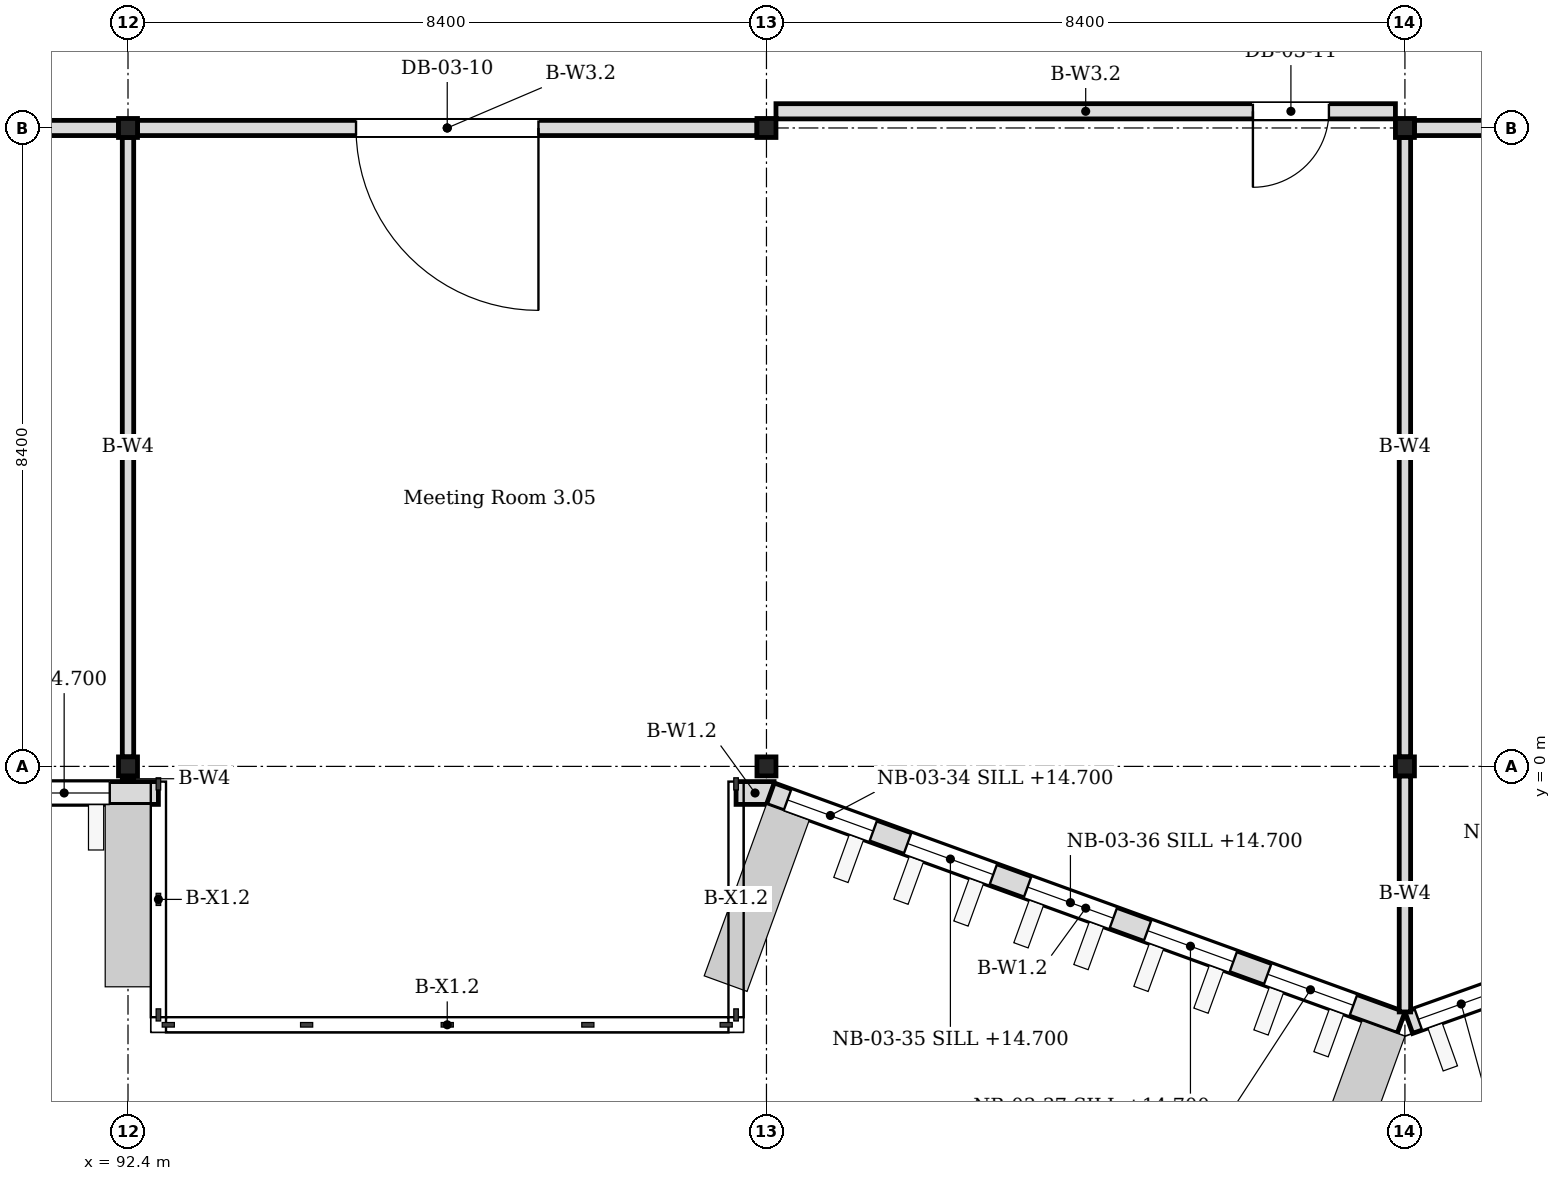
"""IFC4 building model, lengths in metres.
Left out: names, types, materials, properties, quantities, classifications, styles, units other than length and angle.
Written with IfcOpenShell. Run it as: python <this file> out.ifc"""

import sys

from ifc_helpers import new_model, si_unit, direction, frame, frame_2d, origin, origin_2d, place, context, subcontext, project, spatial, rectangle, i_section, extrude, element, fill, save


model = new_model("IFC4")
c1 = context("Model", 3, precision=1e-05, world=origin(), true_north=direction((0.0, 1.0)))
c2 = subcontext(c1, "Body", "Model", "MODEL_VIEW")
j1 = project(units=[si_unit("LENGTHUNIT", "METRE"), si_unit("PLANEANGLEUNIT", "RADIAN")], contexts=[c1])
p1 = place(None, origin())
s1 = spatial("IfcSite", under=j1, at=p1, CompositionType="ELEMENT")
p2 = place(p1, origin())
s2 = spatial("IfcBuilding", under=s1, at=p2, CompositionType="ELEMENT")
p3 = place(p2, frame((0.0, 0.0, 14.4)))
s3 = spatial("IfcBuildingStorey", under=s2, at=p3, CompositionType="ELEMENT", Elevation=14.4)
for number, where, z_axis, x_axis in (
    (1, (92.4, 0.0, 0.0), (0.0, 0.0, 1.0), (1.0, 0.0, 0.0)),
    (2, (92.4, 8.4, 0.0), (0.0, 0.0, 1.0), (1.0, 0.0, 0.0)),
    (3, (100.8, 0.0, 0.0), (0.0, 0.0, 1.0), (1.0, 0.0, 0.0)),
    (4, (100.8, 8.4, 0.0), (0.0, 0.0, 1.0), (1.0, 0.0, 0.0)),
    (5, (109.2, 0.0, 0.0), (0.0, 0.0, 1.0), (1.0, 0.0, 0.0)),
    (6, (109.2, 8.4, 0.0), (0.0, 0.0, 1.0), (1.0, 0.0, 0.0)),
):
    element("IfcColumn", number, at=place(p3, frame(where, z_axis=z_axis, x_axis=x_axis)), inside=s3, PredefinedType="COLUMN", context=c2, shape_type="SweptSolid", body=[
        extrude(i_section(OverallWidth=0.25, OverallDepth=0.25, WebThickness=0.009, FlangeThickness=0.014, FilletRadius=0.013, at=origin_2d()), origin(), (0.0, 0.0, 1.0), 3.95),
    ])
p4 = place(p3, frame((83.6, -0.35, 0.0), z_axis=(0.0, 0.0, 1.0), x_axis=(1.0, 0.0, 0.0)))
e7 = element("IfcWall", 7, at=p4, inside=s3, PredefinedType="SOLIDWALL", context=c2, shape_type="SweptSolid", body=[
    extrude(rectangle(XDim=9.2, YDim=0.3, at=frame_2d((4.6, 0.0))), origin(), (0.0, 0.0, 1.0), 3.95),
])
p5 = place(p4, frame((0.64, 0.0, 0.3)))
e8 = element("IfcOpeningElement", 8, at=p5, cuts=e7, PredefinedType="OPENING", context=c2, shape_type="SweptSolid", body=[
    extrude(rectangle(XDim=1.2, YDim=3.3, at=frame_2d((0.6, 1.65))), frame((0.0, 0.16, 0.0), z_axis=(0.0, -1.0, 0.0), x_axis=(1.0, 0.0, 0.0)), (0.0, 0.0, 1.0), 0.32),
])
p6 = place(p4, frame((2.32, 0.0, 0.3)))
e9 = element("IfcOpeningElement", 9, at=p6, cuts=e7, PredefinedType="OPENING", context=c2, shape_type="SweptSolid", body=[
    extrude(rectangle(XDim=1.2, YDim=3.3, at=frame_2d((0.6, 1.65))), frame((0.0, 0.16, 0.0), z_axis=(0.0, -1.0, 0.0), x_axis=(1.0, 0.0, 0.0)), (0.0, 0.0, 1.0), 0.32),
])
p7 = place(p4, frame((4.0, 0.0, 0.3)))
e10 = element("IfcOpeningElement", 10, at=p7, cuts=e7, PredefinedType="OPENING", context=c2, shape_type="SweptSolid", body=[
    extrude(rectangle(XDim=1.2, YDim=3.3, at=frame_2d((0.6, 1.65))), frame((0.0, 0.16, 0.0), z_axis=(0.0, -1.0, 0.0), x_axis=(1.0, 0.0, 0.0)), (0.0, 0.0, 1.0), 0.32),
])
p8 = place(p4, frame((5.68, 0.0, 0.3)))
e11 = element("IfcOpeningElement", 11, at=p8, cuts=e7, PredefinedType="OPENING", context=c2, shape_type="SweptSolid", body=[
    extrude(rectangle(XDim=1.2, YDim=3.3, at=frame_2d((0.6, 1.65))), frame((0.0, 0.16, 0.0), z_axis=(0.0, -1.0, 0.0), x_axis=(1.0, 0.0, 0.0)), (0.0, 0.0, 1.0), 0.32),
])
p9 = place(p4, frame((7.36, 0.0, 0.3)))
e12 = element("IfcOpeningElement", 12, at=p9, cuts=e7, PredefinedType="OPENING", context=c2, shape_type="SweptSolid", body=[
    extrude(rectangle(XDim=1.2, YDim=3.3, at=frame_2d((0.6, 1.65))), frame((0.0, 0.16, 0.0), z_axis=(0.0, -1.0, 0.0), x_axis=(1.0, 0.0, 0.0)), (0.0, 0.0, 1.0), 0.32),
])
p10 = place(p3, frame((100.4, -0.35, 0.0), z_axis=(0.0, 0.0, 1.0), x_axis=(1.0, 0.0, 0.0)))
e13 = element("IfcWall", 13, at=p10, inside=s3, PredefinedType="SOLIDWALL", context=c2, shape_type="SweptSolid", body=[
    extrude(rectangle(XDim=0.5, YDim=0.3, at=frame_2d((0.25, 0.0))), origin(), (0.0, 0.0, 1.0), 3.95),
])
p11 = place(p3, frame((100.851, -0.359, 0.0), z_axis=(0.0, 0.0, 1.0), x_axis=(0.939953187971, -0.341303390584, 0.0)))
e14 = element("IfcWall", 14, at=p11, inside=s3, PredefinedType="SOLIDWALL", context=c2, shape_type="SweptSolid", body=[
    extrude(rectangle(XDim=8.828, YDim=0.3, at=frame_2d((4.414, 0.0))), origin(), (0.0, 0.0, 1.0), 3.95),
])
p12 = place(p11, frame((0.24, 0.0, 0.3)))
e15 = element("IfcOpeningElement", 15, at=p12, cuts=e14, PredefinedType="OPENING", context=c2, shape_type="SweptSolid", body=[
    extrude(rectangle(XDim=1.2, YDim=3.3, at=frame_2d((0.6, 1.65))), frame((0.0, 0.16, 0.0), z_axis=(0.0, -1.0, 0.0), x_axis=(1.0, 0.0, 0.0)), (0.0, 0.0, 1.0), 0.32),
])
p13 = place(p11, frame((1.92, 0.0, 0.3)))
e16 = element("IfcOpeningElement", 16, at=p13, cuts=e14, PredefinedType="OPENING", context=c2, shape_type="SweptSolid", body=[
    extrude(rectangle(XDim=1.2, YDim=3.3, at=frame_2d((0.6, 1.65))), frame((0.0, 0.16, 0.0), z_axis=(0.0, -1.0, 0.0), x_axis=(1.0, 0.0, 0.0)), (0.0, 0.0, 1.0), 0.32),
])
p14 = place(p11, frame((3.6, 0.0, 0.3)))
e17 = element("IfcOpeningElement", 17, at=p14, cuts=e14, PredefinedType="OPENING", context=c2, shape_type="SweptSolid", body=[
    extrude(rectangle(XDim=1.2, YDim=3.3, at=frame_2d((0.6, 1.65))), frame((0.0, 0.16, 0.0), z_axis=(0.0, -1.0, 0.0), x_axis=(1.0, 0.0, 0.0)), (0.0, 0.0, 1.0), 0.32),
])
p15 = place(p11, frame((5.28, 0.0, 0.3)))
e18 = element("IfcOpeningElement", 18, at=p15, cuts=e14, PredefinedType="OPENING", context=c2, shape_type="SweptSolid", body=[
    extrude(rectangle(XDim=1.2, YDim=3.3, at=frame_2d((0.6, 1.65))), frame((0.0, 0.16, 0.0), z_axis=(0.0, -1.0, 0.0), x_axis=(1.0, 0.0, 0.0)), (0.0, 0.0, 1.0), 0.32),
])
p16 = place(p11, frame((6.96, 0.0, 0.3)))
e19 = element("IfcOpeningElement", 19, at=p16, cuts=e14, PredefinedType="OPENING", context=c2, shape_type="SweptSolid", body=[
    extrude(rectangle(XDim=1.2, YDim=3.3, at=frame_2d((0.6, 1.65))), frame((0.0, 0.16, 0.0), z_axis=(0.0, -1.0, 0.0), x_axis=(1.0, 0.0, 0.0)), (0.0, 0.0, 1.0), 0.32),
])
p17 = place(p3, frame((109.251, -3.372, 0.0), z_axis=(0.0, 0.0, 1.0), x_axis=(0.941744418946, 0.336329376334, 0.0)))
e20 = element("IfcWall", 20, at=p17, inside=s3, PredefinedType="SOLIDWALL", context=c2, shape_type="SweptSolid", body=[
    extrude(rectangle(XDim=8.812, YDim=0.3, at=frame_2d((4.406, 0.0))), origin(), (0.0, 0.0, 1.0), 3.95),
])
p18 = place(p17, frame((0.132, 0.0, 0.3)))
e21 = element("IfcOpeningElement", 21, at=p18, cuts=e20, PredefinedType="OPENING", context=c2, shape_type="SweptSolid", body=[
    extrude(rectangle(XDim=1.2, YDim=3.3, at=frame_2d((0.6, 1.65))), frame((0.0, 0.16, 0.0), z_axis=(0.0, -1.0, 0.0), x_axis=(1.0, 0.0, 0.0)), (0.0, 0.0, 1.0), 0.32),
])
p19 = place(p17, frame((1.812, 0.0, 0.3)))
e22 = element("IfcOpeningElement", 22, at=p19, cuts=e20, PredefinedType="OPENING", context=c2, shape_type="SweptSolid", body=[
    extrude(rectangle(XDim=1.2, YDim=3.3, at=frame_2d((0.6, 1.65))), frame((0.0, 0.16, 0.0), z_axis=(0.0, -1.0, 0.0), x_axis=(1.0, 0.0, 0.0)), (0.0, 0.0, 1.0), 0.32),
])
p20 = place(p17, frame((3.492, 0.0, 0.3)))
e23 = element("IfcOpeningElement", 23, at=p20, cuts=e20, PredefinedType="OPENING", context=c2, shape_type="SweptSolid", body=[
    extrude(rectangle(XDim=1.2, YDim=3.3, at=frame_2d((0.6, 1.65))), frame((0.0, 0.16, 0.0), z_axis=(0.0, -1.0, 0.0), x_axis=(1.0, 0.0, 0.0)), (0.0, 0.0, 1.0), 0.32),
])
p21 = place(p17, frame((5.172, 0.0, 0.3)))
e24 = element("IfcOpeningElement", 24, at=p21, cuts=e20, PredefinedType="OPENING", context=c2, shape_type="SweptSolid", body=[
    extrude(rectangle(XDim=1.2, YDim=3.3, at=frame_2d((0.6, 1.65))), frame((0.0, 0.16, 0.0), z_axis=(0.0, -1.0, 0.0), x_axis=(1.0, 0.0, 0.0)), (0.0, 0.0, 1.0), 0.32),
])
p22 = place(p17, frame((6.852, 0.0, 0.3)))
e25 = element("IfcOpeningElement", 25, at=p22, cuts=e20, PredefinedType="OPENING", context=c2, shape_type="SweptSolid", body=[
    extrude(rectangle(XDim=1.2, YDim=3.3, at=frame_2d((0.6, 1.65))), frame((0.0, 0.16, 0.0), z_axis=(0.0, -1.0, 0.0), x_axis=(1.0, 0.0, 0.0)), (0.0, 0.0, 1.0), 0.32),
])
p23 = place(p3, frame((84.125, 8.4, 0.0), z_axis=(0.0, 0.0, 1.0), x_axis=(1.0, 0.0, 0.0)))
e26 = element("IfcWall", 26, at=p23, inside=s3, PredefinedType="PARTITIONING", context=c2, shape_type="SweptSolid", body=[
    extrude(rectangle(XDim=8.15, YDim=0.2, at=frame_2d((4.075, 0.0))), origin(), (0.0, 0.0, 1.0), 3.25),
])
p24 = place(p23, frame((3.575, 0.0, 0.0)))
e27 = element("IfcOpeningElement", 27, at=p24, cuts=e26, PredefinedType="OPENING", context=c2, shape_type="SweptSolid", body=[
    extrude(rectangle(XDim=1.0, YDim=2.1, at=frame_2d((0.5, 1.05))), frame((0.0, 0.11, 0.0), z_axis=(0.0, -1.0, 0.0), x_axis=(1.0, 0.0, 0.0)), (0.0, 0.0, 1.0), 0.22),
])
p25 = place(p3, frame((92.525, 8.4, 0.0), z_axis=(0.0, 0.0, 1.0), x_axis=(1.0, 0.0, 0.0)))
e28 = element("IfcWall", 28, at=p25, inside=s3, PredefinedType="PARTITIONING", context=c2, shape_type="SweptSolid", body=[
    extrude(rectangle(XDim=8.15, YDim=0.2, at=frame_2d((4.075, 0.0))), origin(), (0.0, 0.0, 1.0), 3.25),
])
p26 = place(p25, frame((2.875, 0.0, 0.0)))
e29 = element("IfcOpeningElement", 29, at=p26, cuts=e28, PredefinedType="OPENING", context=c2, shape_type="SweptSolid", body=[
    extrude(rectangle(XDim=2.4, YDim=2.2, at=frame_2d((1.2, 1.1))), frame((0.0, 0.11, 0.0), z_axis=(0.0, -1.0, 0.0), x_axis=(1.0, 0.0, 0.0)), (0.0, 0.0, 1.0), 0.22),
])
p27 = place(p3, frame((100.925, 8.619, 0.0), z_axis=(0.0, 0.0, 1.0), x_axis=(1.0, 0.0, 0.0)))
e30 = element("IfcWall", 30, at=p27, inside=s3, PredefinedType="PARTITIONING", context=c2, shape_type="SweptSolid", body=[
    extrude(rectangle(XDim=8.15, YDim=0.2, at=frame_2d((4.075, 0.0))), origin(), (0.0, 0.0, 1.0), 3.25),
])
p28 = place(p27, frame((6.275, 0.0, 0.0)))
e31 = element("IfcOpeningElement", 31, at=p28, cuts=e30, PredefinedType="OPENING", context=c2, shape_type="SweptSolid", body=[
    extrude(rectangle(XDim=1.0, YDim=2.1, at=frame_2d((0.5, 1.05))), frame((0.0, 0.11, 0.0), z_axis=(0.0, -1.0, 0.0), x_axis=(1.0, 0.0, 0.0)), (0.0, 0.0, 1.0), 0.22),
])
p29 = place(p3, frame((109.325, 8.4, 0.0), z_axis=(0.0, 0.0, 1.0), x_axis=(1.0, 0.0, 0.0)))
e32 = element("IfcWall", 32, at=p29, inside=s3, PredefinedType="PARTITIONING", context=c2, shape_type="SweptSolid", body=[
    extrude(rectangle(XDim=8.15, YDim=0.2, at=frame_2d((4.075, 0.0))), origin(), (0.0, 0.0, 1.0), 3.25),
])
p30 = place(p29, frame((3.175, 0.0, 0.0)))
e33 = element("IfcOpeningElement", 33, at=p30, cuts=e32, PredefinedType="OPENING", context=c2, shape_type="SweptSolid", body=[
    extrude(rectangle(XDim=1.8, YDim=2.1, at=frame_2d((0.9, 1.05))), frame((0.0, 0.11, 0.0), z_axis=(0.0, -1.0, 0.0), x_axis=(1.0, 0.0, 0.0)), (0.0, 0.0, 1.0), 0.22),
])
p31 = place(p3, frame((92.4, -0.2, 0.0), z_axis=(0.0, 0.0, 1.0), x_axis=(0.0, 1.0, 0.0)))
e34 = element("IfcWall", 34, at=p31, inside=s3, PredefinedType="PARTITIONING", context=c2, shape_type="SweptSolid", body=[
    extrude(rectangle(XDim=0.075, YDim=0.15, at=frame_2d((0.038, 0.0))), origin(), (0.0, 0.0, 1.0), 3.25),
])
p32 = place(p3, frame((92.4, 0.125, 0.0), z_axis=(0.0, 0.0, 1.0), x_axis=(0.0, 1.0, 0.0)))
e35 = element("IfcWall", 35, at=p32, inside=s3, PredefinedType="PARTITIONING", context=c2, shape_type="SweptSolid", body=[
    extrude(rectangle(XDim=8.15, YDim=0.15, at=frame_2d((4.075, 0.0))), origin(), (0.0, 0.0, 1.0), 3.25),
])
p33 = place(p3, frame((109.2, -3.231, 0.0), z_axis=(0.0, 0.0, 1.0), x_axis=(0.0, 1.0, 0.0)))
e36 = element("IfcWall", 36, at=p33, inside=s3, PredefinedType="PARTITIONING", context=c2, shape_type="SweptSolid", body=[
    extrude(rectangle(XDim=3.106, YDim=0.15, at=frame_2d((1.553, 0.0))), origin(), (0.0, 0.0, 1.0), 3.25),
])
p34 = place(p3, frame((109.2, 0.125, 0.0), z_axis=(0.0, 0.0, 1.0), x_axis=(0.0, 1.0, 0.0)))
e37 = element("IfcWall", 37, at=p34, inside=s3, PredefinedType="PARTITIONING", context=c2, shape_type="SweptSolid", body=[
    extrude(rectangle(XDim=8.15, YDim=0.15, at=frame_2d((4.075, 0.0))), origin(), (0.0, 0.0, 1.0), 3.25),
])
p35 = place(p9, origin())
e38 = element("IfcWindow", 38, at=p35, inside=s3, PartitioningType="TRIPLE_PANEL_VERTICAL", PredefinedType="WINDOW", context=c2, shape_type="SweptSolid", body=[
    extrude(rectangle(XDim=1.2, YDim=3.3, at=frame_2d((0.6, 1.65))), frame((0.0, 0.03, 0.0), z_axis=(0.0, -1.0, 0.0), x_axis=(1.0, 0.0, 0.0)), (0.0, 0.0, 1.0), 0.06),
])
fill(e12, e38)
p36 = place(p12, origin())
e39 = element("IfcWindow", 39, at=p36, inside=s3, PartitioningType="TRIPLE_PANEL_VERTICAL", PredefinedType="WINDOW", context=c2, shape_type="SweptSolid", body=[
    extrude(rectangle(XDim=1.2, YDim=3.3, at=frame_2d((0.6, 1.65))), frame((0.0, 0.03, 0.0), z_axis=(0.0, -1.0, 0.0), x_axis=(1.0, 0.0, 0.0)), (0.0, 0.0, 1.0), 0.06),
])
fill(e15, e39)
p37 = place(p13, origin())
e40 = element("IfcWindow", 40, at=p37, inside=s3, PartitioningType="TRIPLE_PANEL_VERTICAL", PredefinedType="WINDOW", context=c2, shape_type="SweptSolid", body=[
    extrude(rectangle(XDim=1.2, YDim=3.3, at=frame_2d((0.6, 1.65))), frame((0.0, 0.03, 0.0), z_axis=(0.0, -1.0, 0.0), x_axis=(1.0, 0.0, 0.0)), (0.0, 0.0, 1.0), 0.06),
])
fill(e16, e40)
p38 = place(p14, origin())
e41 = element("IfcWindow", 41, at=p38, inside=s3, PartitioningType="TRIPLE_PANEL_VERTICAL", PredefinedType="WINDOW", context=c2, shape_type="SweptSolid", body=[
    extrude(rectangle(XDim=1.2, YDim=3.3, at=frame_2d((0.6, 1.65))), frame((0.0, 0.03, 0.0), z_axis=(0.0, -1.0, 0.0), x_axis=(1.0, 0.0, 0.0)), (0.0, 0.0, 1.0), 0.06),
])
fill(e17, e41)
p39 = place(p15, origin())
e42 = element("IfcWindow", 42, at=p39, inside=s3, PartitioningType="TRIPLE_PANEL_VERTICAL", PredefinedType="WINDOW", context=c2, shape_type="SweptSolid", body=[
    extrude(rectangle(XDim=1.2, YDim=3.3, at=frame_2d((0.6, 1.65))), frame((0.0, 0.03, 0.0), z_axis=(0.0, -1.0, 0.0), x_axis=(1.0, 0.0, 0.0)), (0.0, 0.0, 1.0), 0.06),
])
fill(e18, e42)
p40 = place(p16, origin())
e43 = element("IfcWindow", 43, at=p40, inside=s3, PartitioningType="TRIPLE_PANEL_VERTICAL", PredefinedType="WINDOW", context=c2, shape_type="SweptSolid", body=[
    extrude(rectangle(XDim=1.2, YDim=3.3, at=frame_2d((0.6, 1.65))), frame((0.0, 0.03, 0.0), z_axis=(0.0, -1.0, 0.0), x_axis=(1.0, 0.0, 0.0)), (0.0, 0.0, 1.0), 0.06),
])
fill(e19, e43)
p41 = place(p18, origin())
e44 = element("IfcWindow", 44, at=p41, inside=s3, PartitioningType="TRIPLE_PANEL_VERTICAL", PredefinedType="WINDOW", context=c2, shape_type="SweptSolid", body=[
    extrude(rectangle(XDim=1.2, YDim=3.3, at=frame_2d((0.6, 1.65))), frame((0.0, 0.03, 0.0), z_axis=(0.0, -1.0, 0.0), x_axis=(1.0, 0.0, 0.0)), (0.0, 0.0, 1.0), 0.06),
])
fill(e21, e44)
p42 = place(p26, origin())
e45 = element("IfcDoor", 45, at=p42, inside=s3, OperationType="DOUBLE_DOOR_SINGLE_SWING", PredefinedType="DOOR", context=c2, shape_type="SweptSolid", body=[
    extrude(rectangle(XDim=2.4, YDim=2.2, at=frame_2d((1.2, 1.1))), frame((0.0, 0.025, 0.0), z_axis=(0.0, -1.0, 0.0), x_axis=(1.0, 0.0, 0.0)), (0.0, 0.0, 1.0), 0.05),
])
fill(e29, e45)
p43 = place(p28, origin())
e46 = element("IfcDoor", 46, at=p43, inside=s3, OperationType="SINGLE_SWING_LEFT", PredefinedType="DOOR", context=c2, shape_type="SweptSolid", body=[
    extrude(rectangle(XDim=1.0, YDim=2.1, at=frame_2d((0.5, 1.05))), frame((0.0, 0.025, 0.0), z_axis=(0.0, -1.0, 0.0), x_axis=(1.0, 0.0, 0.0)), (0.0, 0.0, 1.0), 0.05),
])
fill(e31, e46)
save(model, sys.argv[1])
